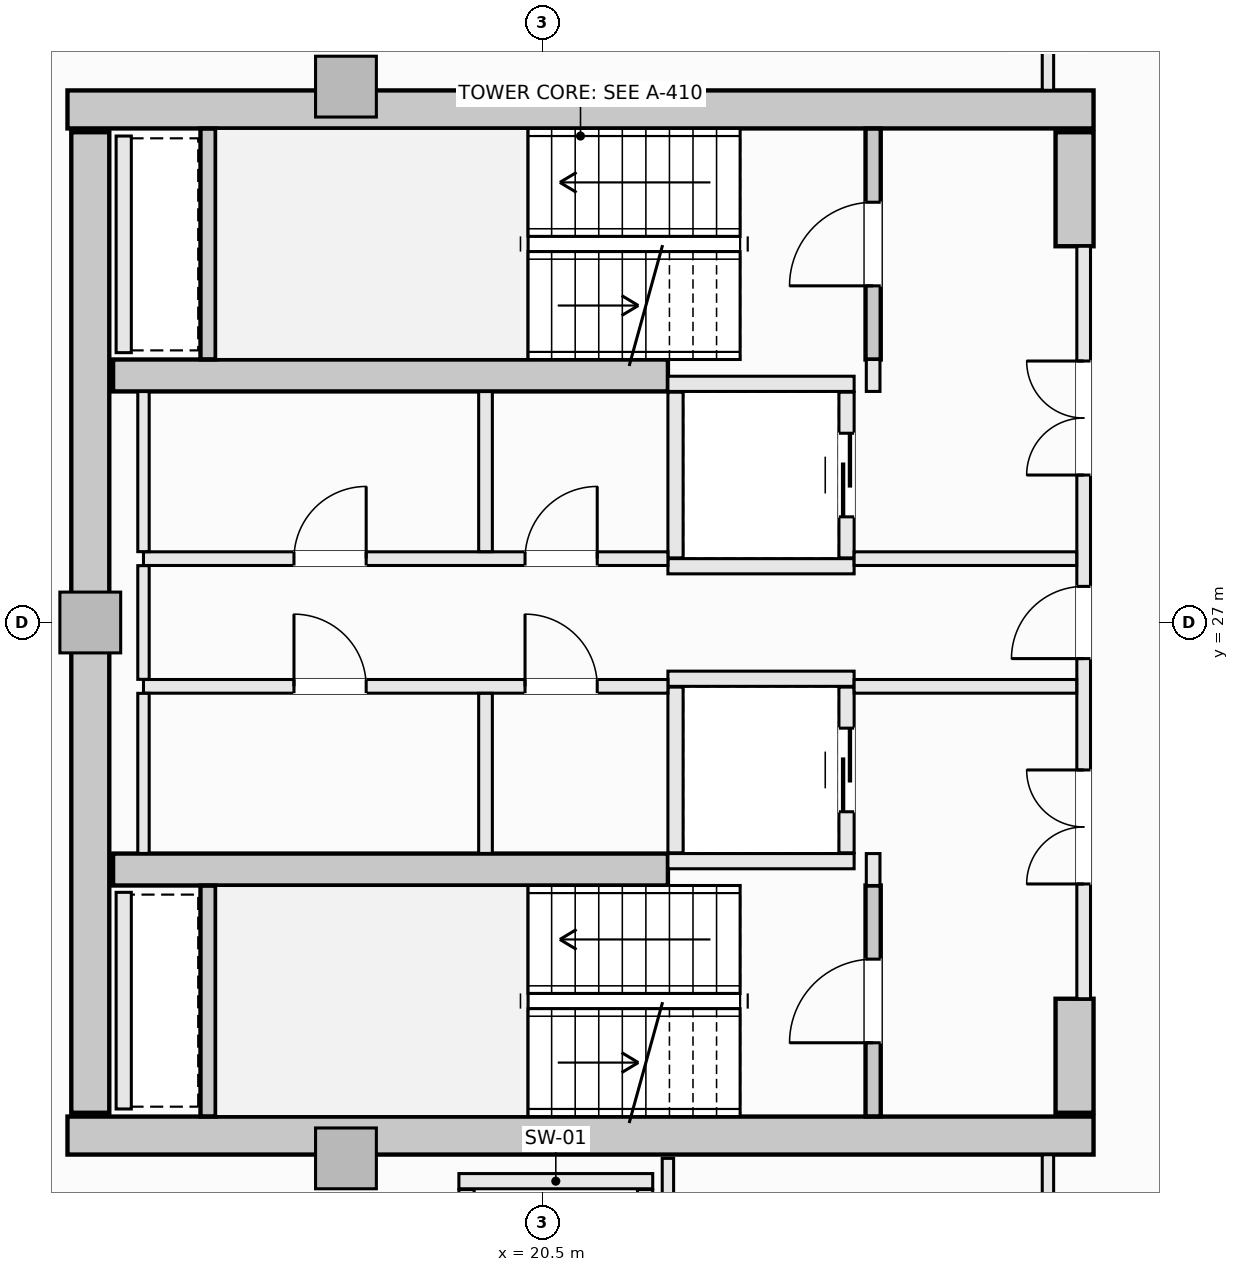
"""IFC4 building model, lengths in metres.
Left out: names, types, materials, properties, quantities, classifications, styles, units other than length and angle.
Written with IfcOpenShell. Run it as: python <this file> out.ifc"""

import sys

from ifc_helpers import new_model, si_unit, direction, frame, frame_2d, origin, origin_2d, place, context, subcontext, project, spatial, rectangle, extrude, element, fill, save


model = new_model("IFC4")
c1 = context("Model", 3, precision=1e-05, world=origin(), true_north=direction((0.0, 1.0)))
c2 = subcontext(c1, "Body", "Model", "MODEL_VIEW")
j1 = project(units=[si_unit("LENGTHUNIT", "METRE"), si_unit("PLANEANGLEUNIT", "RADIAN")], contexts=[c1])
p1 = place(None, origin())
s1 = spatial("IfcSite", under=j1, at=p1, CompositionType="ELEMENT")
p2 = place(p1, origin())
s2 = spatial("IfcBuilding", under=s1, at=p2, CompositionType="ELEMENT")
p3 = place(p2, frame((0.0, 0.0, 249.2)))
s3 = spatial("IfcBuildingStorey", under=s2, at=p3, CompositionType="ELEMENT", Elevation=249.2)
for number, where, z_axis, x_axis in (
    (1, (14.25, 33.75, -0.27), (0.0, 0.0, 1.0), (1.0, 0.0, 0.0)),
    (2, (14.25, 20.25, -0.27), (0.0, 0.0, 1.0), (1.0, 0.0, 0.0)),
):
    element("IfcWall", number, at=place(p3, frame(where, z_axis=z_axis, x_axis=x_axis)), inside=s3, PredefinedType="SHEAR", context=c2, shape_type="SweptSolid", body=[
        extrude(rectangle(XDim=13.5, YDim=0.5, at=frame_2d((6.75, 0.0))), origin(), (0.0, 0.0, 1.0), 3.3),
    ])
p4 = place(p3, frame((14.55, 20.55, -0.27), z_axis=(0.0, 0.0, 1.0), x_axis=(0.0, 1.0, 0.0)))
e3 = element("IfcWall", 3, at=p4, inside=s3, PredefinedType="SHEAR", context=c2, shape_type="SweptSolid", body=[
    extrude(rectangle(XDim=12.9, YDim=0.5, at=frame_2d((6.45, 0.0))), origin(), (0.0, 0.0, 1.0), 3.3),
])
for number, where, z_axis, x_axis in (
    (4, (27.5, 31.95, -0.27), (0.0, 0.0, 1.0), (0.0, 1.0, 0.0)),
    (5, (27.5, 20.55, -0.27), (0.0, 0.0, 1.0), (0.0, 1.0, 0.0)),
):
    element("IfcWall", number, at=place(p3, frame(where, z_axis=z_axis, x_axis=x_axis)), inside=s3, PredefinedType="SHEAR", context=c2, shape_type="SweptSolid", body=[
        extrude(rectangle(XDim=1.5, YDim=0.5, at=frame_2d((0.75, 0.0))), origin(), (0.0, 0.0, 1.0), 3.3),
    ])
for number, where, z_axis, x_axis in (
    (6, (14.85, 30.25, -0.27), (0.0, 0.0, 1.0), (1.0, 0.0, 0.0)),
    (7, (14.85, 23.75, -0.27), (0.0, 0.0, 1.0), (1.0, 0.0, 0.0)),
):
    element("IfcWall", number, at=place(p3, frame(where, z_axis=z_axis, x_axis=x_axis)), inside=s3, PredefinedType="SHEAR", context=c2, shape_type="SweptSolid", body=[
        extrude(rectangle(XDim=7.3, YDim=0.42, at=frame_2d((3.65, 0.0))), origin(), (0.0, 0.0, 1.0), 3.3),
    ])
for number, where, z_axis, x_axis in (
    (8, (17.914, 34.05, -0.27), (0.0, 0.0, 1.0), (1.0, 0.0, 0.0)),
    (9, (14.55, 27.0, -0.27), (0.0, 0.0, 1.0), (1.0, 0.0, 0.0)),
    (10, (17.914, 19.95, -0.27), (0.0, 0.0, 1.0), (1.0, 0.0, 0.0)),
):
    element("IfcColumn", number, at=place(p3, frame(where, z_axis=z_axis, x_axis=x_axis)), inside=s3, PredefinedType="PILASTER", context=c2, shape_type="SweptSolid", body=[
        extrude(rectangle(XDim=0.8, YDim=0.8, at=origin_2d()), origin(), (0.0, 0.0, 1.0), 3.3),
    ])
p5 = place(p3, frame((24.85, 30.46, -0.27), z_axis=(0.0, 0.0, 1.0), x_axis=(0.0, 1.0, 0.0)))
e11 = element("IfcWall", 11, at=p5, inside=s3, PredefinedType="SHEAR", context=c2, shape_type="SweptSolid", body=[
    extrude(rectangle(XDim=3.038, YDim=0.2, at=frame_2d((1.519, 0.0))), origin(), (0.0, 0.0, 1.0), 3.3),
])
p6 = place(p5, frame((0.969, 0.0, 0.27)))
e12 = element("IfcOpeningElement", 12, at=p6, cuts=e11, PredefinedType="OPENING", context=c2, shape_type="SweptSolid", body=[
    extrude(rectangle(XDim=1.1, YDim=2.15, at=frame_2d((0.55, 1.075))), frame((0.0, 0.11, 0.0), z_axis=(0.0, -1.0, 0.0), x_axis=(1.0, 0.0, 0.0)), (0.0, 0.0, 1.0), 0.22),
])
p7 = place(p3, frame((16.1, 30.462, -0.27), z_axis=(0.0, 0.0, 1.0), x_axis=(0.0, 1.0, 0.0)))
e13 = element("IfcWall", 13, at=p7, inside=s3, PredefinedType="SHEAR", context=c2, shape_type="SweptSolid", body=[
    extrude(rectangle(XDim=3.036, YDim=0.2, at=frame_2d((1.518, 0.0))), origin(), (0.0, 0.0, 1.0), 3.3),
])
p8 = place(p3, frame((24.85, 20.502, -0.27), z_axis=(0.0, 0.0, 1.0), x_axis=(0.0, 1.0, 0.0)))
e14 = element("IfcWall", 14, at=p8, inside=s3, PredefinedType="SHEAR", context=c2, shape_type="SweptSolid", body=[
    extrude(rectangle(XDim=3.038, YDim=0.2, at=frame_2d((1.519, 0.0))), origin(), (0.0, 0.0, 1.0), 3.3),
])
p9 = place(p8, frame((0.969, 0.0, 0.27)))
e15 = element("IfcOpeningElement", 15, at=p9, cuts=e14, PredefinedType="OPENING", context=c2, shape_type="SweptSolid", body=[
    extrude(rectangle(XDim=1.1, YDim=2.15, at=frame_2d((0.55, 1.075))), frame((0.0, 0.11, 0.0), z_axis=(0.0, -1.0, 0.0), x_axis=(1.0, 0.0, 0.0)), (0.0, 0.0, 1.0), 0.22),
])
p10 = place(p3, frame((16.1, 20.502, -0.27), z_axis=(0.0, 0.0, 1.0), x_axis=(0.0, 1.0, 0.0)))
e16 = element("IfcWall", 16, at=p10, inside=s3, PredefinedType="SHEAR", context=c2, shape_type="SweptSolid", body=[
    extrude(rectangle(XDim=3.036, YDim=0.2, at=frame_2d((1.518, 0.0))), origin(), (0.0, 0.0, 1.0), 3.3),
])
for number, where, z_axis, x_axis in (
    (17, (22.15, 30.14, 0.0), (0.0, 0.0, 1.0), (1.0, 0.0, 0.0)),
    (18, (22.15, 27.74, 0.0), (0.0, 0.0, 1.0), (1.0, 0.0, 0.0)),
):
    element("IfcWall", number, at=place(p3, frame(where, z_axis=z_axis, x_axis=x_axis)), inside=s3, PredefinedType="SOLIDWALL", context=c2, shape_type="SweptSolid", body=[
        extrude(rectangle(XDim=2.45, YDim=0.2, at=frame_2d((1.225, 0.0))), origin(), (0.0, 0.0, 1.0), 3.03),
    ])
p11 = place(p3, frame((22.25, 27.85, 0.0), z_axis=(0.0, 0.0, 1.0), x_axis=(0.0, 1.0, 0.0)))
e19 = element("IfcWall", 19, at=p11, inside=s3, PredefinedType="SOLIDWALL", context=c2, shape_type="SweptSolid", body=[
    extrude(rectangle(XDim=2.18, YDim=0.2, at=frame_2d((1.09, 0.0))), origin(), (0.0, 0.0, 1.0), 3.03),
])
p12 = place(p3, frame((24.5, 27.85, 0.0), z_axis=(0.0, 0.0, 1.0), x_axis=(0.0, 1.0, 0.0)))
e20 = element("IfcWall", 20, at=p12, inside=s3, PredefinedType="SOLIDWALL", context=c2, shape_type="SweptSolid", body=[
    extrude(rectangle(XDim=2.18, YDim=0.2, at=frame_2d((1.09, 0.0))), origin(), (0.0, 0.0, 1.0), 3.03),
])
p13 = place(p12, frame((0.54, 0.0, 0.0)))
e21 = element("IfcOpeningElement", 21, at=p13, cuts=e20, PredefinedType="OPENING", context=c2, shape_type="SweptSolid", body=[
    extrude(rectangle(XDim=1.1, YDim=2.2, at=frame_2d((0.55, 1.1))), frame((0.0, 0.11, 0.0), z_axis=(0.0, -1.0, 0.0), x_axis=(1.0, 0.0, 0.0)), (0.0, 0.0, 1.0), 0.22),
])
for number, where, z_axis, x_axis in (
    (22, (22.15, 26.26, 0.0), (0.0, 0.0, 1.0), (1.0, 0.0, 0.0)),
    (23, (22.15, 23.86, 0.0), (0.0, 0.0, 1.0), (1.0, 0.0, 0.0)),
):
    element("IfcWall", number, at=place(p3, frame(where, z_axis=z_axis, x_axis=x_axis)), inside=s3, PredefinedType="SOLIDWALL", context=c2, shape_type="SweptSolid", body=[
        extrude(rectangle(XDim=2.45, YDim=0.2, at=frame_2d((1.225, 0.0))), origin(), (0.0, 0.0, 1.0), 3.03),
    ])
p14 = place(p3, frame((22.25, 23.97, 0.0), z_axis=(0.0, 0.0, 1.0), x_axis=(0.0, 1.0, 0.0)))
e24 = element("IfcWall", 24, at=p14, inside=s3, PredefinedType="SOLIDWALL", context=c2, shape_type="SweptSolid", body=[
    extrude(rectangle(XDim=2.18, YDim=0.2, at=frame_2d((1.09, 0.0))), origin(), (0.0, 0.0, 1.0), 3.03),
])
p15 = place(p3, frame((24.5, 23.97, 0.0), z_axis=(0.0, 0.0, 1.0), x_axis=(0.0, 1.0, 0.0)))
e25 = element("IfcWall", 25, at=p15, inside=s3, PredefinedType="SOLIDWALL", context=c2, shape_type="SweptSolid", body=[
    extrude(rectangle(XDim=2.18, YDim=0.2, at=frame_2d((1.09, 0.0))), origin(), (0.0, 0.0, 1.0), 3.03),
])
p16 = place(p15, frame((0.54, 0.0, 0.0)))
e26 = element("IfcOpeningElement", 26, at=p16, cuts=e25, PredefinedType="OPENING", context=c2, shape_type="SweptSolid", body=[
    extrude(rectangle(XDim=1.1, YDim=2.2, at=frame_2d((0.55, 1.1))), frame((0.0, 0.11, 0.0), z_axis=(0.0, -1.0, 0.0), x_axis=(1.0, 0.0, 0.0)), (0.0, 0.0, 1.0), 0.22),
])
p17 = place(p3, frame((19.4, 19.65, 0.0), z_axis=(0.0, 0.0, 1.0), x_axis=(1.0, 0.0, 0.0)))
e27 = element("IfcWall", 27, at=p17, inside=s3, PredefinedType="SOLIDWALL", context=c2, shape_type="SweptSolid", body=[
    extrude(rectangle(XDim=2.55, YDim=0.2, at=frame_2d((1.275, 0.0))), origin(), (0.0, 0.0, 1.0), 3.03),
])
for number, where, z_axis, x_axis in (
    (28, (19.5, 17.01, 0.0), (0.0, 0.0, 1.0), (0.0, 1.0, 0.0)),
    (29, (21.85, 17.01, 0.0), (0.0, 0.0, 1.0), (0.0, 1.0, 0.0)),
):
    element("IfcWall", number, at=place(p3, frame(where, z_axis=z_axis, x_axis=x_axis)), inside=s3, PredefinedType="SOLIDWALL", context=c2, shape_type="SweptSolid", body=[
        extrude(rectangle(XDim=2.53, YDim=0.2, at=frame_2d((1.265, 0.0))), origin(), (0.0, 0.0, 1.0), 3.03),
    ])
for number, where, z_axis, x_axis in (
    (30, (14.99, 30.55, 0.0), (0.0, 0.0, 1.0), (0.0, 1.0, 0.0)),
    (31, (14.99, 20.6, 0.0), (0.0, 0.0, 1.0), (0.0, 1.0, 0.0)),
):
    element("IfcWall", number, at=place(p3, frame(where, z_axis=z_axis, x_axis=x_axis)), inside=s3, PredefinedType="SOLIDWALL", context=c2, shape_type="SweptSolid", body=[
        extrude(rectangle(XDim=2.85, YDim=0.2, at=frame_2d((1.425, 0.0))), origin(), (0.0, 0.0, 1.0), 3.03),
    ])
for number, where, z_axis, x_axis in (
    (32, (24.85, 23.54, 0.0), (0.0, 0.0, 1.0), (0.0, 1.0, 0.0)),
    (33, (24.85, 30.04, 0.0), (0.0, 0.0, 1.0), (0.0, 1.0, 0.0)),
):
    element("IfcWall", number, at=place(p3, frame(where, z_axis=z_axis, x_axis=x_axis)), inside=s3, PredefinedType="SOLIDWALL", context=c2, shape_type="SweptSolid", body=[
        extrude(rectangle(XDim=0.42, YDim=0.18, at=frame_2d((0.21, 0.0))), origin(), (0.0, 0.0, 1.0), 3.03),
    ])
p18 = place(p3, frame((27.62, 22.05, 0.0), z_axis=(0.0, 0.0, 1.0), x_axis=(0.0, 1.0, 0.0)))
e34 = element("IfcWall", 34, at=p18, inside=s3, PredefinedType="SOLIDWALL", context=c2, shape_type="SweptSolid", body=[
    extrude(rectangle(XDim=9.9, YDim=0.18, at=frame_2d((4.95, 0.0))), origin(), (0.0, 0.0, 1.0), 3.03),
])
p19 = place(p18, frame((4.475, 0.0, 0.0)))
e35 = element("IfcOpeningElement", 35, at=p19, cuts=e34, PredefinedType="OPENING", context=c2, shape_type="SweptSolid", body=[
    extrude(rectangle(XDim=0.95, YDim=2.1, at=frame_2d((0.475, 1.05))), frame((0.0, 0.1, 0.0), z_axis=(0.0, -1.0, 0.0), x_axis=(1.0, 0.0, 0.0)), (0.0, 0.0, 1.0), 0.2),
])
p20 = place(p18, frame((6.89, 0.0, 0.0)))
e36 = element("IfcOpeningElement", 36, at=p20, cuts=e34, PredefinedType="OPENING", context=c2, shape_type="SweptSolid", body=[
    extrude(rectangle(XDim=1.5, YDim=2.2, at=frame_2d((0.75, 1.1))), frame((0.0, 0.1, 0.0), z_axis=(0.0, -1.0, 0.0), x_axis=(1.0, 0.0, 0.0)), (0.0, 0.0, 1.0), 0.2),
])
p21 = place(p18, frame((1.51, 0.0, 0.0)))
e37 = element("IfcOpeningElement", 37, at=p21, cuts=e34, PredefinedType="OPENING", context=c2, shape_type="SweptSolid", body=[
    extrude(rectangle(XDim=1.5, YDim=2.2, at=frame_2d((0.75, 1.1))), frame((0.0, 0.1, 0.0), z_axis=(0.0, -1.0, 0.0), x_axis=(1.0, 0.0, 0.0)), (0.0, 0.0, 1.0), 0.2),
])
p22 = place(p3, frame((15.25, 27.84, 0.0), z_axis=(0.0, 0.0, 1.0), x_axis=(1.0, 0.0, 0.0)))
e38 = element("IfcWall", 38, at=p22, inside=s3, PredefinedType="SOLIDWALL", context=c2, shape_type="SweptSolid", body=[
    extrude(rectangle(XDim=6.9, YDim=0.18, at=frame_2d((3.45, 0.0))), origin(), (0.0, 0.0, 1.0), 3.03),
])
p23 = place(p22, frame((5.02, 0.0, 0.0)))
e39 = element("IfcOpeningElement", 39, at=p23, cuts=e38, PredefinedType="OPENING", context=c2, shape_type="SweptSolid", body=[
    extrude(rectangle(XDim=0.95, YDim=2.1, at=frame_2d((0.475, 1.05))), frame((0.0, 0.1, 0.0), z_axis=(0.0, -1.0, 0.0), x_axis=(1.0, 0.0, 0.0)), (0.0, 0.0, 1.0), 0.2),
])
p24 = place(p22, frame((1.98, 0.0, 0.0)))
e40 = element("IfcOpeningElement", 40, at=p24, cuts=e38, PredefinedType="OPENING", context=c2, shape_type="SweptSolid", body=[
    extrude(rectangle(XDim=0.95, YDim=2.1, at=frame_2d((0.475, 1.05))), frame((0.0, 0.1, 0.0), z_axis=(0.0, -1.0, 0.0), x_axis=(1.0, 0.0, 0.0)), (0.0, 0.0, 1.0), 0.2),
])
p25 = place(p3, frame((24.6, 27.84, 0.0), z_axis=(0.0, 0.0, 1.0), x_axis=(1.0, 0.0, 0.0)))
e41 = element("IfcWall", 41, at=p25, inside=s3, PredefinedType="SOLIDWALL", context=c2, shape_type="SweptSolid", body=[
    extrude(rectangle(XDim=2.928, YDim=0.18, at=frame_2d((1.464, 0.0))), origin(), (0.0, 0.0, 1.0), 3.03),
])
p26 = place(p3, frame((15.25, 26.16, 0.0), z_axis=(0.0, 0.0, 1.0), x_axis=(1.0, 0.0, 0.0)))
e42 = element("IfcWall", 42, at=p26, inside=s3, PredefinedType="SOLIDWALL", context=c2, shape_type="SweptSolid", body=[
    extrude(rectangle(XDim=6.9, YDim=0.18, at=frame_2d((3.45, 0.0))), origin(), (0.0, 0.0, 1.0), 3.03),
])
p27 = place(p26, frame((5.02, 0.0, 0.0)))
e43 = element("IfcOpeningElement", 43, at=p27, cuts=e42, PredefinedType="OPENING", context=c2, shape_type="SweptSolid", body=[
    extrude(rectangle(XDim=0.95, YDim=2.1, at=frame_2d((0.475, 1.05))), frame((0.0, 0.1, 0.0), z_axis=(0.0, -1.0, 0.0), x_axis=(1.0, 0.0, 0.0)), (0.0, 0.0, 1.0), 0.2),
])
p28 = place(p26, frame((1.98, 0.0, 0.0)))
e44 = element("IfcOpeningElement", 44, at=p28, cuts=e42, PredefinedType="OPENING", context=c2, shape_type="SweptSolid", body=[
    extrude(rectangle(XDim=0.95, YDim=2.1, at=frame_2d((0.475, 1.05))), frame((0.0, 0.1, 0.0), z_axis=(0.0, -1.0, 0.0), x_axis=(1.0, 0.0, 0.0)), (0.0, 0.0, 1.0), 0.2),
])
p29 = place(p3, frame((24.6, 26.16, 0.0), z_axis=(0.0, 0.0, 1.0), x_axis=(1.0, 0.0, 0.0)))
e45 = element("IfcWall", 45, at=p29, inside=s3, PredefinedType="SOLIDWALL", context=c2, shape_type="SweptSolid", body=[
    extrude(rectangle(XDim=2.928, YDim=0.18, at=frame_2d((1.464, 0.0))), origin(), (0.0, 0.0, 1.0), 3.03),
])
p30 = place(p3, frame((15.25, 23.962, 0.0), z_axis=(0.0, 0.0, 1.0), x_axis=(0.0, 1.0, 0.0)))
e46 = element("IfcWall", 46, at=p30, inside=s3, PredefinedType="PARTITIONING", context=c2, shape_type="SweptSolid", body=[
    extrude(rectangle(XDim=2.106, YDim=0.15, at=frame_2d((1.053, 0.0))), origin(), (0.0, 0.0, 1.0), 3.03),
])
p31 = place(p3, frame((15.25, 26.252, 0.0), z_axis=(0.0, 0.0, 1.0), x_axis=(0.0, 1.0, 0.0)))
e47 = element("IfcWall", 47, at=p31, inside=s3, PredefinedType="PARTITIONING", context=c2, shape_type="SweptSolid", body=[
    extrude(rectangle(XDim=1.496, YDim=0.15, at=frame_2d((0.748, 0.0))), origin(), (0.0, 0.0, 1.0), 3.03),
])
p32 = place(p3, frame((15.25, 27.932, 0.0), z_axis=(0.0, 0.0, 1.0), x_axis=(0.0, 1.0, 0.0)))
e48 = element("IfcWall", 48, at=p32, inside=s3, PredefinedType="PARTITIONING", context=c2, shape_type="SweptSolid", body=[
    extrude(rectangle(XDim=2.106, YDim=0.15, at=frame_2d((1.053, 0.0))), origin(), (0.0, 0.0, 1.0), 3.03),
])
for number, where, z_axis, x_axis in (
    (49, (19.75, 23.962, 0.0), (0.0, 0.0, 1.0), (0.0, 1.0, 0.0)),
    (50, (19.75, 27.932, 0.0), (0.0, 0.0, 1.0), (0.0, 1.0, 0.0)),
):
    element("IfcWall", number, at=place(p3, frame(where, z_axis=z_axis, x_axis=x_axis)), inside=s3, PredefinedType="SOLIDWALL", context=c2, shape_type="SweptSolid", body=[
        extrude(rectangle(XDim=2.106, YDim=0.18, at=frame_2d((1.053, 0.0))), origin(), (0.0, 0.0, 1.0), 3.03),
    ])
p33 = place(p3, frame((22.15, 17.127, 0.0), z_axis=(0.0, 0.0, 1.0), x_axis=(0.0, 1.0, 0.0)))
e51 = element("IfcWall", 51, at=p33, inside=s3, PredefinedType="PARTITIONING", context=c2, shape_type="SweptSolid", body=[
    extrude(rectangle(XDim=2.823, YDim=0.15, at=frame_2d((1.412, 0.0))), origin(), (0.0, 0.0, 1.0), 3.03),
])
p34 = place(p3, frame((27.15, 17.127, 0.0), z_axis=(0.0, 0.0, 1.0), x_axis=(0.0, 1.0, 0.0)))
e52 = element("IfcWall", 52, at=p34, inside=s3, PredefinedType="PARTITIONING", context=c2, shape_type="SweptSolid", body=[
    extrude(rectangle(XDim=2.871, YDim=0.15, at=frame_2d((1.436, 0.0))), origin(), (0.0, 0.0, 1.0), 3.03),
])
p35 = place(p34, frame((0.96, 0.0, 0.0)))
e53 = element("IfcOpeningElement", 53, at=p35, cuts=e52, PredefinedType="OPENING", context=c2, shape_type="SweptSolid", body=[
    extrude(rectangle(XDim=0.95, YDim=2.1, at=frame_2d((0.475, 1.05))), frame((0.0, 0.085, 0.0), z_axis=(0.0, -1.0, 0.0), x_axis=(1.0, 0.0, 0.0)), (0.0, 0.0, 1.0), 0.17),
])
p36 = place(p3, frame((27.15, 34.002, 0.0), z_axis=(0.0, 0.0, 1.0), x_axis=(0.0, 1.0, 0.0)))
e54 = element("IfcWall", 54, at=p36, inside=s3, PredefinedType="PARTITIONING", context=c2, shape_type="SweptSolid", body=[
    extrude(rectangle(XDim=4.198, YDim=0.15, at=frame_2d((2.099, 0.0))), origin(), (0.0, 0.0, 1.0), 3.03),
])
p37 = place(p36, frame((1.998, 0.0, 0.0)))
e55 = element("IfcOpeningElement", 55, at=p37, cuts=e54, PredefinedType="OPENING", context=c2, shape_type="SweptSolid", body=[
    extrude(rectangle(XDim=0.95, YDim=2.1, at=frame_2d((0.475, 1.05))), frame((0.0, 0.085, 0.0), z_axis=(0.0, -1.0, 0.0), x_axis=(1.0, 0.0, 0.0)), (0.0, 0.0, 1.0), 0.17),
])
p38 = place(p6, origin())
e56 = element("IfcDoor", 56, at=p38, inside=s3, OperationType="SINGLE_SWING_LEFT", PredefinedType="DOOR", context=c2, shape_type="SweptSolid", body=[
    extrude(rectangle(XDim=1.1, YDim=2.15, at=frame_2d((0.55, 1.075))), frame((0.0, 0.025, 0.0), z_axis=(0.0, -1.0, 0.0), x_axis=(1.0, 0.0, 0.0)), (0.0, 0.0, 1.0), 0.05),
])
fill(e12, e56)
p39 = place(p9, origin())
e57 = element("IfcDoor", 57, at=p39, inside=s3, OperationType="SINGLE_SWING_LEFT", PredefinedType="DOOR", context=c2, shape_type="SweptSolid", body=[
    extrude(rectangle(XDim=1.1, YDim=2.15, at=frame_2d((0.55, 1.075))), frame((0.0, 0.025, 0.0), z_axis=(0.0, -1.0, 0.0), x_axis=(1.0, 0.0, 0.0)), (0.0, 0.0, 1.0), 0.05),
])
fill(e15, e57)
p40 = place(p13, origin())
e58 = element("IfcDoor", 58, at=p40, inside=s3, OperationType="SLIDING_TO_LEFT", PredefinedType="DOOR", context=c2, shape_type="SweptSolid", body=[
    extrude(rectangle(XDim=1.1, YDim=2.2, at=frame_2d((0.55, 1.1))), frame((0.0, 0.025, 0.0), z_axis=(0.0, -1.0, 0.0), x_axis=(1.0, 0.0, 0.0)), (0.0, 0.0, 1.0), 0.05),
])
fill(e21, e58)
p41 = place(p16, origin())
e59 = element("IfcDoor", 59, at=p41, inside=s3, OperationType="SLIDING_TO_LEFT", PredefinedType="DOOR", context=c2, shape_type="SweptSolid", body=[
    extrude(rectangle(XDim=1.1, YDim=2.2, at=frame_2d((0.55, 1.1))), frame((0.0, 0.025, 0.0), z_axis=(0.0, -1.0, 0.0), x_axis=(1.0, 0.0, 0.0)), (0.0, 0.0, 1.0), 0.05),
])
fill(e26, e59)
p42 = place(p19, origin())
e60 = element("IfcDoor", 60, at=p42, inside=s3, OperationType="SINGLE_SWING_LEFT", PredefinedType="DOOR", context=c2, shape_type="SweptSolid", body=[
    extrude(rectangle(XDim=0.95, YDim=2.1, at=frame_2d((0.475, 1.05))), frame((0.0, 0.025, 0.0), z_axis=(0.0, -1.0, 0.0), x_axis=(1.0, 0.0, 0.0)), (0.0, 0.0, 1.0), 0.05),
])
fill(e35, e60)
p43 = place(p20, origin())
e61 = element("IfcDoor", 61, at=p43, inside=s3, OperationType="DOUBLE_DOOR_SINGLE_SWING", PredefinedType="DOOR", context=c2, shape_type="SweptSolid", body=[
    extrude(rectangle(XDim=1.5, YDim=2.2, at=frame_2d((0.75, 1.1))), frame((0.0, 0.025, 0.0), z_axis=(0.0, -1.0, 0.0), x_axis=(1.0, 0.0, 0.0)), (0.0, 0.0, 1.0), 0.05),
])
fill(e36, e61)
p44 = place(p21, origin())
e62 = element("IfcDoor", 62, at=p44, inside=s3, OperationType="DOUBLE_DOOR_SINGLE_SWING", PredefinedType="DOOR", context=c2, shape_type="SweptSolid", body=[
    extrude(rectangle(XDim=1.5, YDim=2.2, at=frame_2d((0.75, 1.1))), frame((0.0, 0.025, 0.0), z_axis=(0.0, -1.0, 0.0), x_axis=(1.0, 0.0, 0.0)), (0.0, 0.0, 1.0), 0.05),
])
fill(e37, e62)
p45 = place(p23, origin())
e63 = element("IfcDoor", 63, at=p45, inside=s3, OperationType="SINGLE_SWING_RIGHT", PredefinedType="DOOR", context=c2, shape_type="SweptSolid", body=[
    extrude(rectangle(XDim=0.95, YDim=2.1, at=frame_2d((0.475, 1.05))), frame((0.0, 0.025, 0.0), z_axis=(0.0, -1.0, 0.0), x_axis=(1.0, 0.0, 0.0)), (0.0, 0.0, 1.0), 0.05),
])
fill(e39, e63)
p46 = place(p27, origin())
e64 = element("IfcDoor", 64, at=p46, inside=s3, OperationType="SINGLE_SWING_LEFT", PredefinedType="DOOR", context=c2, shape_type="SweptSolid", body=[
    extrude(rectangle(XDim=0.95, YDim=2.1, at=frame_2d((0.475, 1.05))), frame((0.0, 0.025, 0.0), z_axis=(0.0, -1.0, 0.0), x_axis=(1.0, 0.0, 0.0)), (0.0, 0.0, 1.0), 0.05),
])
fill(e43, e64)
p47 = place(p24, origin())
e65 = element("IfcDoor", 65, at=p47, inside=s3, OperationType="SINGLE_SWING_RIGHT", PredefinedType="DOOR", context=c2, shape_type="SweptSolid", body=[
    extrude(rectangle(XDim=0.95, YDim=2.1, at=frame_2d((0.475, 1.05))), frame((0.0, 0.025, 0.0), z_axis=(0.0, -1.0, 0.0), x_axis=(1.0, 0.0, 0.0)), (0.0, 0.0, 1.0), 0.05),
])
fill(e40, e65)
p48 = place(p28, origin())
e66 = element("IfcDoor", 66, at=p48, inside=s3, OperationType="SINGLE_SWING_LEFT", PredefinedType="DOOR", context=c2, shape_type="SweptSolid", body=[
    extrude(rectangle(XDim=0.95, YDim=2.1, at=frame_2d((0.475, 1.05))), frame((0.0, 0.025, 0.0), z_axis=(0.0, -1.0, 0.0), x_axis=(1.0, 0.0, 0.0)), (0.0, 0.0, 1.0), 0.05),
])
fill(e44, e66)
save(model, sys.argv[1])
